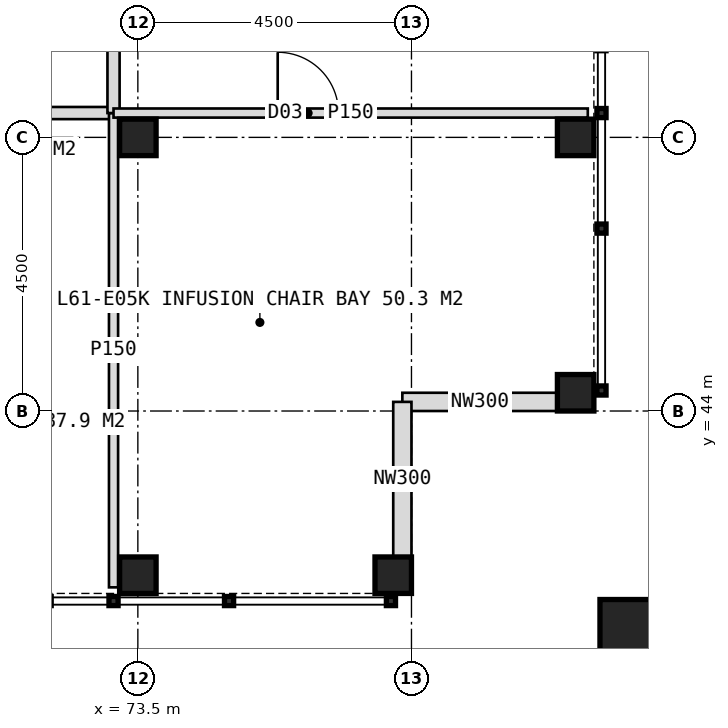
"""IFC4 building model, lengths in metres.
Left out: names, types, materials, properties, quantities, classifications, styles, units other than length and angle.
Written with IfcOpenShell. Run it as: python <this file> out.ifc"""

import sys

from ifc_helpers import new_model, si_unit, direction, frame, frame_2d, origin, origin_2d, place, context, subcontext, project, spatial, rectangle, hollow_rectangle, extrude, element, fill, save


model = new_model("IFC4")
c1 = context("Model", 3, precision=1e-05, world=origin(), true_north=direction((0.0, 1.0)))
c2 = subcontext(c1, "Body", "Model", "MODEL_VIEW")
j1 = project(units=[si_unit("LENGTHUNIT", "METRE"), si_unit("PLANEANGLEUNIT", "RADIAN")], contexts=[c1])
p1 = place(None, origin())
s1 = spatial("IfcSite", under=j1, at=p1, CompositionType="ELEMENT")
p2 = place(p1, origin())
s2 = spatial("IfcBuilding", under=s1, at=p2, CompositionType="ELEMENT")
p3 = place(p2, frame((0.0, 0.0, 254.0)))
s3 = spatial("IfcBuildingStorey", under=s2, at=p3, CompositionType="ELEMENT", Elevation=254.0)
for number, where, z_axis, x_axis in (
    (1, (73.5, 48.5, 0.0), (0.0, 0.0, 1.0), (1.0, 0.0, 0.0)),
    (2, (80.7, 44.3, 0.0), (0.0, 0.0, 1.0), (1.0, 0.0, 0.0)),
    (3, (80.7, 48.5, 0.0), (0.0, 0.0, 1.0), (1.0, 0.0, 0.0)),
    (4, (73.5, 41.3, 0.0), (0.0, 0.0, 1.0), (1.0, 0.0, 0.0)),
    (5, (77.7, 41.3, 0.0), (0.0, 0.0, 1.0), (1.0, 0.0, 0.0)),
):
    element("IfcColumn", number, at=place(p3, frame(where, z_axis=z_axis, x_axis=x_axis)), inside=s3, PredefinedType="COLUMN", context=c2, shape_type="SweptSolid", body=[
        extrude(hollow_rectangle(XDim=0.6, YDim=0.6, WallThickness=0.04, at=origin_2d()), origin(), (0.0, 0.0, 1.0), 4.0),
    ])
p4 = place(p3, frame((81.6, 40.4, 0.0), z_axis=(0.0, 0.0, 1.0), x_axis=(1.0, 0.0, 0.0)))
e6 = element("IfcColumn", 6, at=p4, inside=s3, PredefinedType="COLUMN", context=c2, shape_type="SweptSolid", body=[
    extrude(hollow_rectangle(XDim=1.0, YDim=1.0, WallThickness=0.06, at=origin_2d()), origin(), (0.0, 0.0, 1.0), 4.0),
])
for number, where, z_axis, x_axis in (
    (7, (80.4, 44.15, 0.0), (0.0, 0.0, 1.0), (-1.0, 0.0, 0.0)),
    (8, (77.85, 44.15, 0.0), (0.0, 0.0, 1.0), (0.0, -1.0, 0.0)),
):
    element("IfcWall", number, at=place(p3, frame(where, z_axis=z_axis, x_axis=x_axis)), inside=s3, PredefinedType="ELEMENTEDWALL", context=c2, shape_type="SweptSolid", body=[
        extrude(rectangle(XDim=2.55, YDim=0.3, at=frame_2d((1.275, 0.0))), origin(), (0.0, 0.0, 1.0), 2.95),
    ])
p5 = place(p3, frame((73.1, 48.9, 0.0), z_axis=(0.0, 0.0, 1.0), x_axis=(-1.0, 0.0, 0.0)))
e9 = element("IfcWall", 9, at=p5, inside=s3, PredefinedType="PARTITIONING", context=c2, shape_type="SweptSolid", body=[
    extrude(rectangle(XDim=26.2, YDim=0.2, at=frame_2d((13.1, 0.0))), origin(), (0.0, 0.0, 1.0), 3.75),
])
p6 = place(p5, frame((1.75, 0.0, 0.0)))
e10 = element("IfcOpeningElement", 10, at=p6, cuts=e9, PredefinedType="OPENING", context=c2, shape_type="SweptSolid", body=[
    extrude(rectangle(XDim=1.2, YDim=2.2, at=frame_2d((0.6, 1.1))), frame((0.0, 0.11, 0.0), z_axis=(0.0, -1.0, 0.0), x_axis=(1.0, 0.0, 0.0)), (0.0, 0.0, 1.0), 0.22),
])
p7 = place(p5, frame((6.75, 0.0, 0.0)))
e11 = element("IfcOpeningElement", 11, at=p7, cuts=e9, PredefinedType="OPENING", context=c2, shape_type="SweptSolid", body=[
    extrude(rectangle(XDim=1.0, YDim=2.1, at=frame_2d((0.5, 1.05))), frame((0.0, 0.11, 0.0), z_axis=(0.0, -1.0, 0.0), x_axis=(1.0, 0.0, 0.0)), (0.0, 0.0, 1.0), 0.22),
])
p8 = place(p5, frame((11.1, 0.0, 0.0)))
e12 = element("IfcOpeningElement", 12, at=p8, cuts=e9, PredefinedType="OPENING", context=c2, shape_type="SweptSolid", body=[
    extrude(rectangle(XDim=1.0, YDim=2.1, at=frame_2d((0.5, 1.05))), frame((0.0, 0.11, 0.0), z_axis=(0.0, -1.0, 0.0), x_axis=(1.0, 0.0, 0.0)), (0.0, 0.0, 1.0), 0.22),
])
p9 = place(p5, frame((14.1, 0.0, 0.0)))
e13 = element("IfcOpeningElement", 13, at=p9, cuts=e9, PredefinedType="OPENING", context=c2, shape_type="SweptSolid", body=[
    extrude(rectangle(XDim=1.0, YDim=2.1, at=frame_2d((0.5, 1.05))), frame((0.0, 0.11, 0.0), z_axis=(0.0, -1.0, 0.0), x_axis=(1.0, 0.0, 0.0)), (0.0, 0.0, 1.0), 0.22),
])
p10 = place(p5, frame((18.45, 0.0, 0.0)))
e14 = element("IfcOpeningElement", 14, at=p10, cuts=e9, PredefinedType="OPENING", context=c2, shape_type="SweptSolid", body=[
    extrude(rectangle(XDim=1.0, YDim=2.1, at=frame_2d((0.5, 1.05))), frame((0.0, 0.11, 0.0), z_axis=(0.0, -1.0, 0.0), x_axis=(1.0, 0.0, 0.0)), (0.0, 0.0, 1.0), 0.22),
])
p11 = place(p5, frame((22.9, 0.0, 0.0)))
e15 = element("IfcOpeningElement", 15, at=p11, cuts=e9, PredefinedType="OPENING", context=c2, shape_type="SweptSolid", body=[
    extrude(rectangle(XDim=1.0, YDim=2.1, at=frame_2d((0.5, 1.05))), frame((0.0, 0.11, 0.0), z_axis=(0.0, -1.0, 0.0), x_axis=(1.0, 0.0, 0.0)), (0.0, 0.0, 1.0), 0.22),
])
p12 = place(p3, frame((73.1, 48.9, 0.0), z_axis=(0.0, 0.0, 1.0), x_axis=(0.0, -1.0, 0.0)))
e16 = element("IfcWall", 16, at=p12, inside=s3, PredefinedType="PARTITIONING", context=c2, shape_type="SweptSolid", body=[
    extrude(rectangle(XDim=7.8, YDim=0.15, at=frame_2d((3.9, 0.0))), origin(), (0.0, 0.0, 1.0), 3.75),
])
p13 = place(p3, frame((73.1, 71.0, 0.0), z_axis=(0.0, 0.0, 1.0), x_axis=(0.0, -1.0, 0.0)))
e17 = element("IfcWall", 17, at=p13, inside=s3, PredefinedType="PARTITIONING", context=c2, shape_type="SweptSolid", body=[
    extrude(rectangle(XDim=22.1, YDim=0.2, at=frame_2d((11.05, 0.0))), origin(), (0.0, 0.0, 1.0), 3.75),
])
p14 = place(p13, frame((2.65, 0.0, 0.0)))
e18 = element("IfcOpeningElement", 18, at=p14, cuts=e17, PredefinedType="OPENING", context=c2, shape_type="SweptSolid", body=[
    extrude(rectangle(XDim=1.0, YDim=2.1, at=frame_2d((0.5, 1.05))), frame((0.0, 0.11, 0.0), z_axis=(0.0, -1.0, 0.0), x_axis=(1.0, 0.0, 0.0)), (0.0, 0.0, 1.0), 0.22),
])
p15 = place(p13, frame((7.0, 0.0, 0.0)))
e19 = element("IfcOpeningElement", 19, at=p15, cuts=e17, PredefinedType="OPENING", context=c2, shape_type="SweptSolid", body=[
    extrude(rectangle(XDim=1.0, YDim=2.1, at=frame_2d((0.5, 1.05))), frame((0.0, 0.11, 0.0), z_axis=(0.0, -1.0, 0.0), x_axis=(1.0, 0.0, 0.0)), (0.0, 0.0, 1.0), 0.22),
])
p16 = place(p13, frame((14.35, 0.0, 0.0)))
e20 = element("IfcOpeningElement", 20, at=p16, cuts=e17, PredefinedType="OPENING", context=c2, shape_type="SweptSolid", body=[
    extrude(rectangle(XDim=1.2, YDim=2.2, at=frame_2d((0.6, 1.1))), frame((0.0, 0.11, 0.0), z_axis=(0.0, -1.0, 0.0), x_axis=(1.0, 0.0, 0.0)), (0.0, 0.0, 1.0), 0.22),
])
p17 = place(p13, frame((19.15, 0.0, 0.0)))
e21 = element("IfcOpeningElement", 21, at=p17, cuts=e17, PredefinedType="OPENING", context=c2, shape_type="SweptSolid", body=[
    extrude(rectangle(XDim=1.2, YDim=2.2, at=frame_2d((0.6, 1.1))), frame((0.0, 0.11, 0.0), z_axis=(0.0, -1.0, 0.0), x_axis=(1.0, 0.0, 0.0)), (0.0, 0.0, 1.0), 0.22),
])
p18 = place(p3, frame((73.1, 48.9, 0.0), z_axis=(0.0, 0.0, 1.0), x_axis=(1.0, 0.0, 0.0)))
e22 = element("IfcWall", 22, at=p18, inside=s3, PredefinedType="PARTITIONING", context=c2, shape_type="SweptSolid", body=[
    extrude(rectangle(XDim=7.8, YDim=0.15, at=frame_2d((3.9, 0.0))), origin(), (0.0, 0.0, 1.0), 3.75),
])
p19 = place(p18, frame((2.7, 0.0, 0.0)))
e23 = element("IfcOpeningElement", 23, at=p19, cuts=e22, PredefinedType="OPENING", context=c2, shape_type="SweptSolid", body=[
    extrude(rectangle(XDim=1.0, YDim=2.1, at=frame_2d((0.5, 1.05))), frame((0.0, 0.085, 0.0), z_axis=(0.0, -1.0, 0.0), x_axis=(1.0, 0.0, 0.0)), (0.0, 0.0, 1.0), 0.17),
])
p20 = place(p19, origin())
e24 = element("IfcDoor", 24, at=p20, inside=s3, OperationType="SINGLE_SWING_LEFT", PredefinedType="DOOR", context=c2, shape_type="SweptSolid", body=[
    extrude(rectangle(XDim=1.0, YDim=2.1, at=frame_2d((0.5, 1.05))), frame((0.0, 0.025, 0.0), z_axis=(0.0, -1.0, 0.0), x_axis=(1.0, 0.0, 0.0)), (0.0, 0.0, 1.0), 0.05),
])
fill(e23, e24)
save(model, sys.argv[1])
